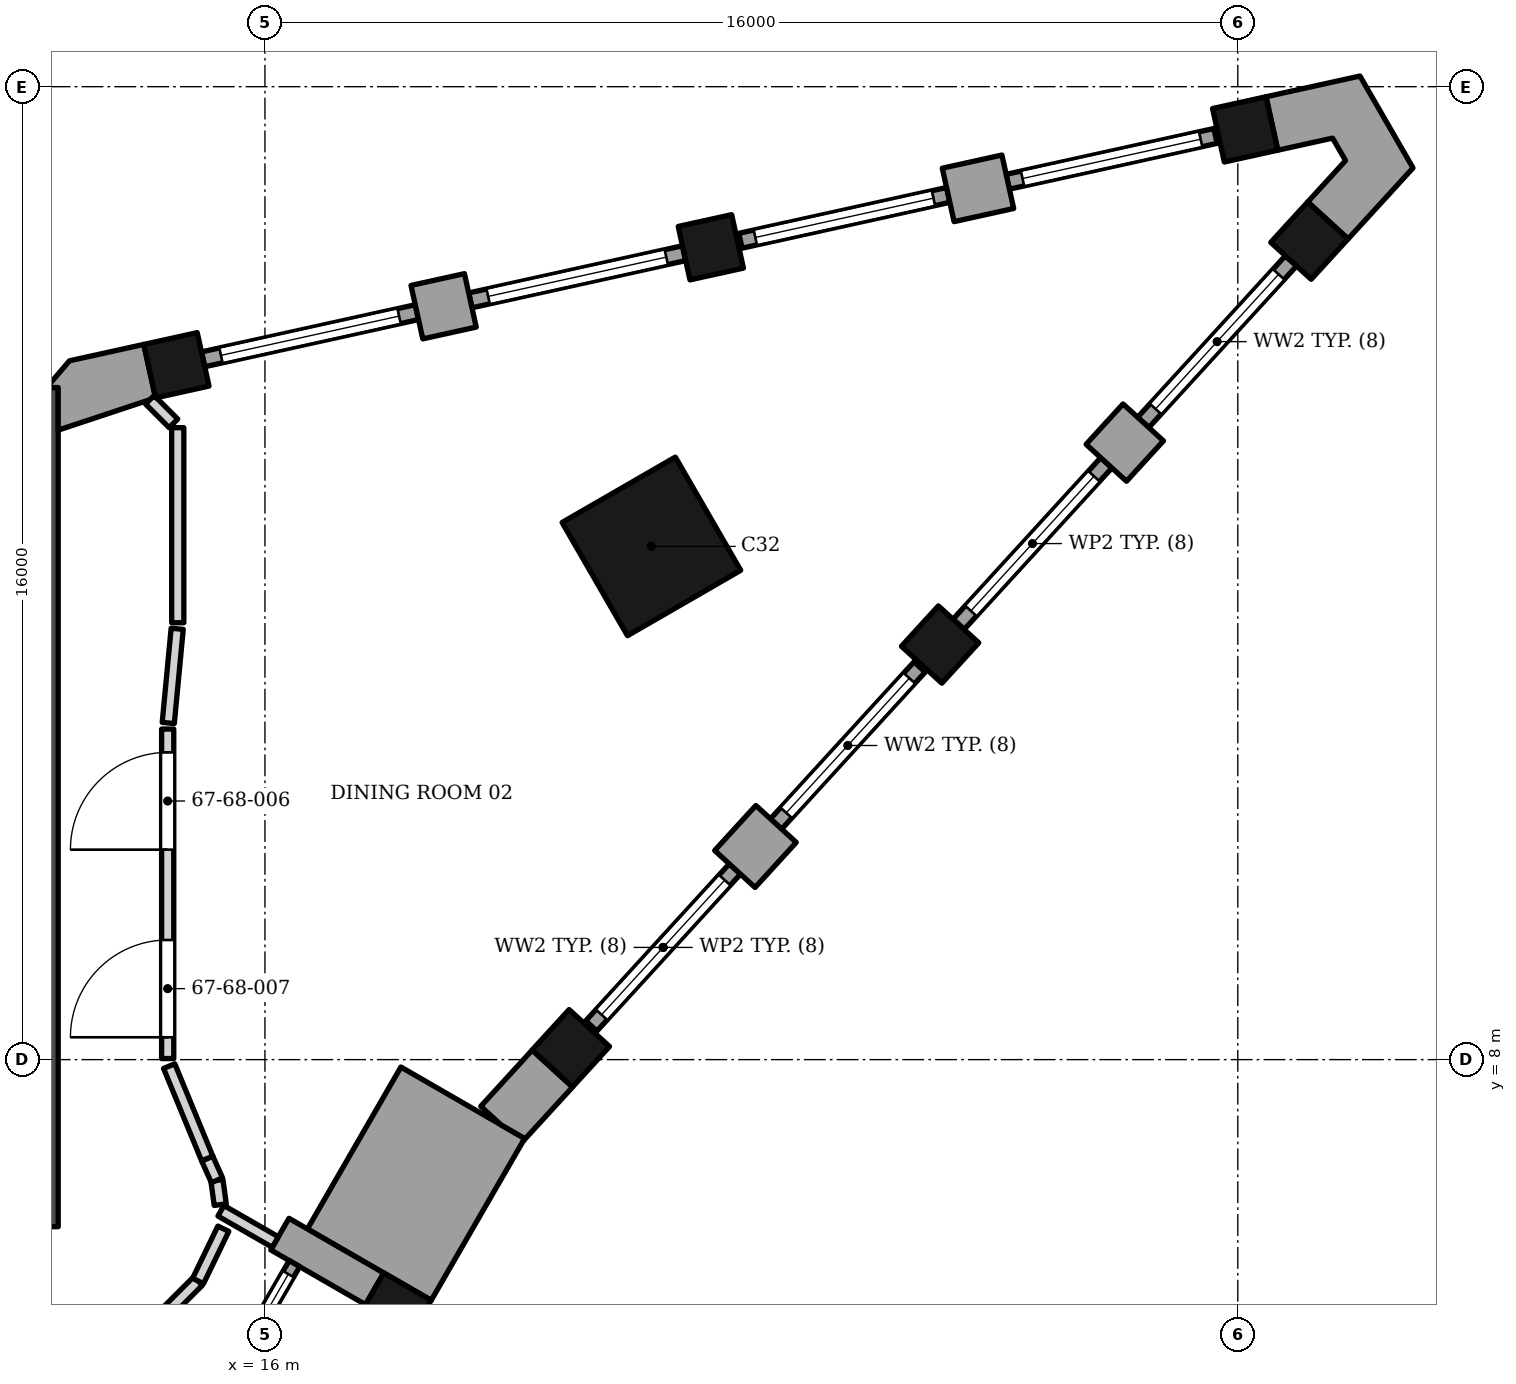
"""IFC4 building model, lengths in metres.
Left out: names, types, materials, properties, quantities, classifications, styles, units other than length and angle.
Written with IfcOpenShell. Run it as: python <this file> out.ifc"""

import sys

from ifc_helpers import new_model, si_unit, direction, frame, frame_2d, origin, origin_2d, place, context, subcontext, project, spatial, polyline, rectangle, outline, extrude, element, fill, save


model = new_model("IFC4")
c1 = context("Model", 3, precision=1e-05, world=origin(), true_north=direction((0.0, 1.0)))
c2 = subcontext(c1, "Body", "Model", "MODEL_VIEW")
j1 = project(units=[si_unit("LENGTHUNIT", "METRE"), si_unit("PLANEANGLEUNIT", "RADIAN")], contexts=[c1])
p1 = place(None, origin())
s1 = spatial("IfcSite", under=j1, at=p1, CompositionType="ELEMENT")
p2 = place(p1, origin())
s2 = spatial("IfcBuilding", under=s1, at=p2, CompositionType="ELEMENT")
p3 = place(p2, frame((0.0, 0.0, 279.4)))
s3 = spatial("IfcBuildingStorey", under=s2, at=p3, CompositionType="ELEMENT", Elevation=279.4)
p4 = place(p3, frame((12.35, 5.253, 0.0), z_axis=(0.0, 0.0, 1.0), x_axis=(0.0, 1.0, 0.0)))
e1 = element("IfcWall", 1, at=p4, inside=s3, PredefinedType="SHEAR", context=c2, shape_type="SweptSolid", body=[
    extrude(rectangle(XDim=13.8, YDim=0.5, at=frame_2d((6.9, 0.0))), origin(), (0.0, 0.0, 1.0), 3.9),
])
p5 = place(p3, frame((22.356, 16.44, 0.0), z_axis=(0.0, 0.0, 1.0), x_axis=(-0.866025403784, -0.5, 0.0)))
e2 = element("IfcColumn", 2, at=p5, inside=s3, PredefinedType="COLUMN", context=c2, shape_type="SweptSolid", body=[
    extrude(rectangle(XDim=2.15, YDim=2.15, at=origin_2d()), origin(), (0.0, 0.0, 1.0), 3.9),
])
for number, where, z_axis, x_axis in (
    (3, (18.119, 3.877, 0.0), (0.0, 0.0, 1.0), (0.5, 0.866, 0.0)),
    (4, (21.031, 8.187, 0.0), (0.0, 0.0, 1.0), (0.675, 0.738, 0.0)),
    (5, (27.104, 14.826, 0.0), (0.0, 0.0, 1.0), (0.675, 0.738, 0.0)),
    (6, (33.178, 21.468, 0.0), (0.0, 0.0, 1.0), (0.675, 0.738, 0.0)),
    (7, (32.121, 23.298, 0.0), (0.0, 0.0, 1.0), (-0.977, -0.215, 0.0)),
    (8, (23.333, 21.359, 0.0), (0.0, 0.0, 1.0), (-0.977, -0.215, 0.0)),
    (9, (14.544, 19.419, 0.0), (0.0, 0.0, 1.0), (-0.977, -0.215, 0.0)),
):
    element("IfcColumn", number, at=place(p3, frame(where, z_axis=z_axis, x_axis=x_axis)), inside=s3, PredefinedType="COLUMN", context=c2, shape_type="SweptSolid", body=[
        extrude(rectangle(XDim=0.9, YDim=0.9, at=origin_2d()), origin(), (0.0, 0.0, 1.0), 3.9),
    ])
p6 = place(p3, frame((17.803, 4.231, 0.0), z_axis=(0.0, 0.0, 1.0), x_axis=(-0.866004803686, 0.500035678719, 0.0)))
e10 = element("IfcWall", 10, at=p6, inside=s3, PredefinedType="SOLIDWALL", context=c2, shape_type="SweptSolid", body=[
    extrude(rectangle(XDim=1.799, YDim=0.6, at=frame_2d((0.899, 0.0))), origin(), (0.0, 0.0, 1.0), 2.95),
])
p7 = place(p3, frame((14.385, 1.008, 0.0), z_axis=(0.0, 0.0, 1.0), x_axis=(0.500027713859, 0.866009402589, 0.0)))
e11 = element("IfcWall", 11, at=p7, inside=s3, PredefinedType="ELEMENTEDWALL", context=c2, shape_type="SweptSolid", body=[
    extrude(rectangle(XDim=4.2, YDim=0.2, at=frame_2d((2.1, 0.0))), origin(), (0.0, 0.0, 1.0), 2.95),
])
p8 = place(p7, frame((0.2, 0.0, 0.45)))
e12 = element("IfcOpeningElement", 12, at=p8, cuts=e11, PredefinedType="OPENING", context=c2, shape_type="SweptSolid", body=[
    extrude(rectangle(XDim=3.8, YDim=2.25, at=frame_2d((1.9, 1.125))), frame((0.0, 0.11, 0.0), z_axis=(0.0, -1.0, 0.0), x_axis=(1.0, 0.0, 0.0)), (0.0, 0.0, 1.0), 0.22),
])
p9 = place(p3, origin())
e13 = element("IfcWall", 13, at=p9, inside=s3, PredefinedType="SOLIDWALL", context=c2, shape_type="SweptSolid", body=[
    extrude(outline(polyline([(18.734, 4.042), (18.733, 4.041), (18.734, 4.04), (20.271, 6.703), (18.236, 7.878), (16.698, 5.215), (17.954, 4.49), (17.954, 4.492), (18.734, 4.042)])), origin(), (0.0, 0.0, 1.0), 2.974),
])
p10 = place(p3, frame((23.729, 11.135, 0.0), z_axis=(0.0, 0.0, 1.0), x_axis=(0.674788120713, 0.738011512203, 0.0)))
e14 = element("IfcWall", 14, at=p10, inside=s3, PredefinedType="SOLIDWALL", context=c2, shape_type="SweptSolid", body=[
    extrude(rectangle(XDim=1.004, YDim=0.9, at=frame_2d((0.502, 0.0))), origin(), (0.0, 0.0, 1.0), 3.0),
])
p11 = place(p3, frame((30.445, 18.479, 0.0), z_axis=(0.0, 0.0, 1.0), x_axis=(-0.674938051731, -0.737874397391, 0.0)))
e15 = element("IfcWall", 15, at=p11, inside=s3, PredefinedType="SOLIDWALL", context=c2, shape_type="SweptSolid", body=[
    extrude(rectangle(XDim=0.9, YDim=0.9, at=frame_2d((0.45, 0.0))), origin(), (0.0, 0.0, 1.0), 3.0),
])
p12 = place(p3, frame((21.368, 8.554, 0.0), z_axis=(0.0, 0.0, 1.0), x_axis=(0.67487449122, 0.737932531537, 0.0)))
e16 = element("IfcWall", 16, at=p12, inside=s3, PredefinedType="ELEMENTEDWALL", context=c2, shape_type="SweptSolid", body=[
    extrude(rectangle(XDim=3.5, YDim=0.25, at=frame_2d((1.75, 0.0))), origin(), (0.0, 0.0, 1.0), 3.0),
])
p13 = place(p12, frame((0.25, 0.0, 0.3)))
e17 = element("IfcOpeningElement", 17, at=p13, cuts=e16, PredefinedType="OPENING", context=c2, shape_type="SweptSolid", body=[
    extrude(rectangle(XDim=3.0, YDim=2.5, at=frame_2d((1.5, 1.25))), frame((0.0, 0.135, 0.0), z_axis=(0.0, -1.0, 0.0), x_axis=(1.0, 0.0, 0.0)), (0.0, 0.0, 1.0), 0.27),
])
p14 = place(p3, frame((24.405, 11.875, 0.0), z_axis=(0.0, 0.0, 1.0), x_axis=(0.67487449122, 0.737932531537, 0.0)))
e18 = element("IfcWall", 18, at=p14, inside=s3, PredefinedType="ELEMENTEDWALL", context=c2, shape_type="SweptSolid", body=[
    extrude(rectangle(XDim=3.5, YDim=0.25, at=frame_2d((1.75, 0.0))), origin(), (0.0, 0.0, 1.0), 3.0),
])
p15 = place(p14, frame((0.25, 0.0, 0.3)))
e19 = element("IfcOpeningElement", 19, at=p15, cuts=e18, PredefinedType="OPENING", context=c2, shape_type="SweptSolid", body=[
    extrude(rectangle(XDim=3.0, YDim=2.5, at=frame_2d((1.5, 1.25))), frame((0.0, 0.135, 0.0), z_axis=(0.0, -1.0, 0.0), x_axis=(1.0, 0.0, 0.0)), (0.0, 0.0, 1.0), 0.27),
])
p16 = place(p3, frame((27.408, 15.158, 0.0), z_axis=(0.0, 0.0, 1.0), x_axis=(0.674833575111, 0.737969949187, 0.0)))
e20 = element("IfcWall", 20, at=p16, inside=s3, PredefinedType="ELEMENTEDWALL", context=c2, shape_type="SweptSolid", body=[
    extrude(rectangle(XDim=3.6, YDim=0.25, at=frame_2d((1.8, 0.0))), origin(), (0.0, 0.0, 1.0), 3.0),
])
p17 = place(p16, frame((0.3, 0.0, 0.3)))
e21 = element("IfcOpeningElement", 21, at=p17, cuts=e20, PredefinedType="OPENING", context=c2, shape_type="SweptSolid", body=[
    extrude(rectangle(XDim=3.0, YDim=2.5, at=frame_2d((1.5, 1.25))), frame((0.0, 0.135, 0.0), z_axis=(0.0, -1.0, 0.0), x_axis=(1.0, 0.0, 0.0)), (0.0, 0.0, 1.0), 0.27),
])
p18 = place(p3, frame((30.445, 18.479, 0.0), z_axis=(0.0, 0.0, 1.0), x_axis=(0.674833575111, 0.737969949187, 0.0)))
e22 = element("IfcWall", 22, at=p18, inside=s3, PredefinedType="ELEMENTEDWALL", context=c2, shape_type="SweptSolid", body=[
    extrude(rectangle(XDim=3.6, YDim=0.25, at=frame_2d((1.8, 0.0))), origin(), (0.0, 0.0, 1.0), 3.0),
])
p19 = place(p18, frame((0.3, 0.0, 0.3)))
e23 = element("IfcOpeningElement", 23, at=p19, cuts=e22, PredefinedType="OPENING", context=c2, shape_type="SweptSolid", body=[
    extrude(rectangle(XDim=3.0, YDim=2.5, at=frame_2d((1.5, 1.25))), frame((0.0, 0.135, 0.0), z_axis=(0.0, -1.0, 0.0), x_axis=(1.0, 0.0, 0.0)), (0.0, 0.0, 1.0), 0.27),
])
p20 = place(p3, frame((28.217, 22.436, 0.0), z_axis=(0.0, 0.0, 1.0), x_axis=(-0.97656888558, -0.215205045752, 0.0)))
e24 = element("IfcWall", 24, at=p20, inside=s3, PredefinedType="SOLIDWALL", context=c2, shape_type="SweptSolid", body=[
    extrude(rectangle(XDim=1.004, YDim=0.9, at=frame_2d((0.502, 0.0))), origin(), (0.0, 0.0, 1.0), 3.0),
])
p21 = place(p3, frame((18.499, 20.292, 0.0), z_axis=(0.0, 0.0, 1.0), x_axis=(0.976473402733, 0.215637876437, 0.0)))
e25 = element("IfcWall", 25, at=p21, inside=s3, PredefinedType="SOLIDWALL", context=c2, shape_type="SweptSolid", body=[
    extrude(rectangle(XDim=0.9, YDim=0.9, at=frame_2d((0.45, 0.0))), origin(), (0.0, 0.0, 1.0), 3.0),
])
p22 = place(p3, frame((31.633, 23.19, 0.0), z_axis=(0.0, 0.0, 1.0), x_axis=(-0.976509313763, -0.215475196101, 0.0)))
e26 = element("IfcWall", 26, at=p22, inside=s3, PredefinedType="ELEMENTEDWALL", context=c2, shape_type="SweptSolid", body=[
    extrude(rectangle(XDim=3.5, YDim=0.25, at=frame_2d((1.75, 0.0))), origin(), (0.0, 0.0, 1.0), 3.0),
])
p23 = place(p22, frame((0.25, 0.0, 0.3)))
e27 = element("IfcOpeningElement", 27, at=p23, cuts=e26, PredefinedType="OPENING", context=c2, shape_type="SweptSolid", body=[
    extrude(rectangle(XDim=3.0, YDim=2.5, at=frame_2d((1.5, 1.25))), frame((0.0, 0.135, 0.0), z_axis=(0.0, -1.0, 0.0), x_axis=(1.0, 0.0, 0.0)), (0.0, 0.0, 1.0), 0.27),
])
p24 = place(p3, frame((27.239, 22.22, 0.0), z_axis=(0.0, 0.0, 1.0), x_axis=(-0.976509313763, -0.215475196101, 0.0)))
e28 = element("IfcWall", 28, at=p24, inside=s3, PredefinedType="ELEMENTEDWALL", context=c2, shape_type="SweptSolid", body=[
    extrude(rectangle(XDim=3.5, YDim=0.25, at=frame_2d((1.75, 0.0))), origin(), (0.0, 0.0, 1.0), 3.0),
])
p25 = place(p24, frame((0.25, 0.0, 0.3)))
e29 = element("IfcOpeningElement", 29, at=p25, cuts=e28, PredefinedType="OPENING", context=c2, shape_type="SweptSolid", body=[
    extrude(rectangle(XDim=3.0, YDim=2.5, at=frame_2d((1.5, 1.25))), frame((0.0, 0.135, 0.0), z_axis=(0.0, -1.0, 0.0), x_axis=(1.0, 0.0, 0.0)), (0.0, 0.0, 1.0), 0.27),
])
p26 = place(p3, frame((22.893, 21.262, 0.0), z_axis=(0.0, 0.0, 1.0), x_axis=(-0.976513072969, -0.215458159096, 0.0)))
e30 = element("IfcWall", 30, at=p26, inside=s3, PredefinedType="ELEMENTEDWALL", context=c2, shape_type="SweptSolid", body=[
    extrude(rectangle(XDim=3.6, YDim=0.25, at=frame_2d((1.8, 0.0))), origin(), (0.0, 0.0, 1.0), 3.0),
])
p27 = place(p26, frame((0.3, 0.0, 0.3)))
e31 = element("IfcOpeningElement", 31, at=p27, cuts=e30, PredefinedType="OPENING", context=c2, shape_type="SweptSolid", body=[
    extrude(rectangle(XDim=3.0, YDim=2.5, at=frame_2d((1.5, 1.25))), frame((0.0, 0.135, 0.0), z_axis=(0.0, -1.0, 0.0), x_axis=(1.0, 0.0, 0.0)), (0.0, 0.0, 1.0), 0.27),
])
p28 = place(p3, frame((18.499, 20.292, 0.0), z_axis=(0.0, 0.0, 1.0), x_axis=(-0.976513072969, -0.215458159096, 0.0)))
e32 = element("IfcWall", 32, at=p28, inside=s3, PredefinedType="ELEMENTEDWALL", context=c2, shape_type="SweptSolid", body=[
    extrude(rectangle(XDim=3.6, YDim=0.25, at=frame_2d((1.8, 0.0))), origin(), (0.0, 0.0, 1.0), 3.0),
])
p29 = place(p28, frame((0.3, 0.0, 0.3)))
e33 = element("IfcOpeningElement", 33, at=p29, cuts=e32, PredefinedType="OPENING", context=c2, shape_type="SweptSolid", body=[
    extrude(rectangle(XDim=3.0, YDim=2.5, at=frame_2d((1.5, 1.25))), frame((0.0, 0.135, 0.0), z_axis=(0.0, -1.0, 0.0), x_axis=(1.0, 0.0, 0.0)), (0.0, 0.0, 1.0), 0.27),
])
p30 = place(p3, origin())
e34 = element("IfcWall", 34, at=p30, inside=s3, PredefinedType="SOLIDWALL", context=c2, shape_type="SweptSolid", body=[
    extrude(outline(polyline([(20.395, 8.156), (19.549, 7.232), (19.881, 6.928), (20.271, 6.703), (20.247, 6.661), (21.059, 7.549), (20.395, 8.156)])), origin(), (0.0, 0.0, 1.0), 3.0),
])
p31 = place(p3, origin())
e35 = element("IfcWall", 35, at=p31, inside=s3, PredefinedType="SOLIDWALL", context=c2, shape_type="SweptSolid", body=[
    extrude(outline(polyline([(33.814, 21.496), (34.882, 22.664), (34.009, 24.175), (32.464, 23.834), (32.658, 22.955), (33.559, 23.154), (33.772, 22.785), (33.15, 22.104), (33.814, 21.496)])), origin(), (0.0, 0.0, 1.0), 3.0),
])
p32 = place(p3, origin())
e36 = element("IfcWall", 36, at=p32, inside=s3, PredefinedType="SOLIDWALL", context=c2, shape_type="SweptSolid", body=[
    extrude(outline(polyline([(14.201, 18.883), (14.008, 19.762), (12.784, 19.492), (12.41, 19.052), (12.6, 19.052), (12.6, 18.352), (14.201, 18.883)])), origin(), (0.0, 0.0, 1.0), 3.0),
])
p33 = place(p3, frame((14.311, 3.77, 0.0), z_axis=(0.0, 0.0, 1.0), x_axis=(0.707106781187, 0.707106781187, 0.0)))
e37 = element("IfcWall", 37, at=p33, inside=s3, PredefinedType="PARTITIONING", context=c2, shape_type="SweptSolid", body=[
    extrude(rectangle(XDim=0.834, YDim=0.2, at=frame_2d((0.417, 0.0))), origin(), (0.0, 0.0, 1.0), 3.73),
])
p34 = place(p3, frame((15.277, 5.514, 0.0), z_axis=(0.0, 0.0, 1.0), x_axis=(0.866957478323, -0.498382113222, 0.0)))
e38 = element("IfcWall", 38, at=p34, inside=s3, PredefinedType="PARTITIONING", context=c2, shape_type="SweptSolid", body=[
    extrude(rectangle(XDim=1.031, YDim=0.2, at=frame_2d((0.515, 0.0))), origin(), (0.0, 0.0, 1.0), 2.95),
])
p35 = place(p3, frame((14.9, 4.36, 0.0), z_axis=(0.0, 0.0, 1.0), x_axis=(0.435199770088, 0.900333915897, 0.0)))
e39 = element("IfcWall", 39, at=p35, inside=s3, PredefinedType="PARTITIONING", context=c2, shape_type="SweptSolid", body=[
    extrude(rectangle(XDim=0.954, YDim=0.2, at=frame_2d((0.477, 0.0))), origin(), (0.0, 0.0, 1.0), 2.95),
])
p36 = place(p3, frame((15.211, 6.016, 0.0), z_axis=(0.0, 0.0, 1.0), x_axis=(0.133309467874, -0.991074460258, 0.0)))
e40 = element("IfcWall", 40, at=p36, inside=s3, PredefinedType="PARTITIONING", context=c2, shape_type="SweptSolid", body=[
    extrude(rectangle(XDim=0.405, YDim=0.2, at=frame_2d((0.202, 0.0))), origin(), (0.0, 0.0, 1.0), 3.73),
])
p37 = place(p3, frame((15.051, 6.374, 0.0), z_axis=(0.0, 0.0, 1.0), x_axis=(0.408161090952, -0.912909920985, 0.0)))
e41 = element("IfcWall", 41, at=p37, inside=s3, PredefinedType="PARTITIONING", context=c2, shape_type="SweptSolid", body=[
    extrude(rectangle(XDim=0.392, YDim=0.2, at=frame_2d((0.196, 0.0))), origin(), (0.0, 0.0, 1.0), 3.73),
])
p38 = place(p3, frame((14.425, 7.893, 0.0), z_axis=(0.0, 0.0, 1.0), x_axis=(0.380824536343, -0.924647323318, 0.0)))
e42 = element("IfcWall", 42, at=p38, inside=s3, PredefinedType="PARTITIONING", context=c2, shape_type="SweptSolid", body=[
    extrude(rectangle(XDim=1.643, YDim=0.2, at=frame_2d((0.822, 0.0))), origin(), (0.0, 0.0, 1.0), 3.73),
])
p39 = place(p3, frame((14.4, 8.017, 0.0), z_axis=(0.0, 0.0, 1.0), x_axis=(0.0, 1.0, 0.0)))
e43 = element("IfcWall", 43, at=p39, inside=s3, PredefinedType="PARTITIONING", context=c2, shape_type="SweptSolid", body=[
    extrude(rectangle(XDim=5.419, YDim=0.2, at=frame_2d((2.709, 0.0))), origin(), (0.0, 0.0, 1.0), 3.73),
])
p40 = place(p39, frame((3.435, 0.0, 0.0)))
e44 = element("IfcOpeningElement", 44, at=p40, cuts=e43, PredefinedType="OPENING", context=c2, shape_type="SweptSolid", body=[
    extrude(rectangle(XDim=1.6, YDim=2.1, at=frame_2d((0.8, 1.05))), frame((0.0, 0.11, 0.0), z_axis=(0.0, -1.0, 0.0), x_axis=(1.0, 0.0, 0.0)), (0.0, 0.0, 1.0), 0.22),
])
p41 = place(p39, frame((0.35, 0.0, 0.0)))
e45 = element("IfcOpeningElement", 45, at=p41, cuts=e43, PredefinedType="OPENING", context=c2, shape_type="SweptSolid", body=[
    extrude(rectangle(XDim=1.6, YDim=2.1, at=frame_2d((0.8, 1.05))), frame((0.0, 0.11, 0.0), z_axis=(0.0, -1.0, 0.0), x_axis=(1.0, 0.0, 0.0)), (0.0, 0.0, 1.0), 0.22),
])
p42 = place(p3, frame((14.41, 13.536, 0.0), z_axis=(0.0, 0.0, 1.0), x_axis=(0.094453682086, 0.9955292572, 0.0)))
e46 = element("IfcWall", 46, at=p42, inside=s3, PredefinedType="PARTITIONING", context=c2, shape_type="SweptSolid", body=[
    extrude(rectangle(XDim=1.556, YDim=0.2, at=frame_2d((0.778, 0.0))), origin(), (0.0, 0.0, 1.0), 3.73),
])
p43 = place(p3, frame((14.566, 18.393, 0.0), z_axis=(0.0, 0.0, 1.0), x_axis=(0.0, -1.0, 0.0)))
e47 = element("IfcWall", 47, at=p43, inside=s3, PredefinedType="PARTITIONING", context=c2, shape_type="SweptSolid", body=[
    extrude(rectangle(XDim=3.208, YDim=0.2, at=frame_2d((1.604, 0.0))), origin(), (0.0, 0.0, 1.0), 3.73),
])
p44 = place(p3, frame((14.107, 18.852, 0.0), z_axis=(0.0, 0.0, 1.0), x_axis=(0.707106781187, -0.707106781187, 0.0)))
e48 = element("IfcWall", 48, at=p44, inside=s3, PredefinedType="PARTITIONING", context=c2, shape_type="SweptSolid", body=[
    extrude(rectangle(XDim=0.549, YDim=0.2, at=frame_2d((0.275, 0.0))), origin(), (0.0, 0.0, 1.0), 3.73),
])
p45 = place(p8, origin())
e49 = element("IfcWindow", 49, at=p45, inside=s3, PartitioningType="SINGLE_PANEL", PredefinedType="WINDOW", context=c2, shape_type="SweptSolid", body=[
    extrude(rectangle(XDim=3.8, YDim=2.25, at=frame_2d((1.9, 1.125))), frame((0.0, 0.03, 0.0), z_axis=(0.0, -1.0, 0.0), x_axis=(1.0, 0.0, 0.0)), (0.0, 0.0, 1.0), 0.06),
])
fill(e12, e49)
p46 = place(p13, origin())
e50 = element("IfcWindow", 50, at=p46, inside=s3, PartitioningType="SINGLE_PANEL", PredefinedType="WINDOW", context=c2, shape_type="SweptSolid", body=[
    extrude(rectangle(XDim=3.0, YDim=2.5, at=frame_2d((1.5, 1.25))), frame((0.0, 0.03, 0.0), z_axis=(0.0, -1.0, 0.0), x_axis=(1.0, 0.0, 0.0)), (0.0, 0.0, 1.0), 0.06),
])
fill(e17, e50)
p47 = place(p15, origin())
e51 = element("IfcWindow", 51, at=p47, inside=s3, PartitioningType="SINGLE_PANEL", PredefinedType="WINDOW", context=c2, shape_type="SweptSolid", body=[
    extrude(rectangle(XDim=3.0, YDim=2.5, at=frame_2d((1.5, 1.25))), frame((0.0, 0.03, 0.0), z_axis=(0.0, -1.0, 0.0), x_axis=(1.0, 0.0, 0.0)), (0.0, 0.0, 1.0), 0.06),
])
fill(e19, e51)
p48 = place(p17, origin())
e52 = element("IfcWindow", 52, at=p48, inside=s3, PartitioningType="SINGLE_PANEL", PredefinedType="WINDOW", context=c2, shape_type="SweptSolid", body=[
    extrude(rectangle(XDim=3.0, YDim=2.5, at=frame_2d((1.5, 1.25))), frame((0.0, 0.03, 0.0), z_axis=(0.0, -1.0, 0.0), x_axis=(1.0, 0.0, 0.0)), (0.0, 0.0, 1.0), 0.06),
])
fill(e21, e52)
p49 = place(p19, origin())
e53 = element("IfcWindow", 53, at=p49, inside=s3, PartitioningType="SINGLE_PANEL", PredefinedType="WINDOW", context=c2, shape_type="SweptSolid", body=[
    extrude(rectangle(XDim=3.0, YDim=2.5, at=frame_2d((1.5, 1.25))), frame((0.0, 0.03, 0.0), z_axis=(0.0, -1.0, 0.0), x_axis=(1.0, 0.0, 0.0)), (0.0, 0.0, 1.0), 0.06),
])
fill(e23, e53)
p50 = place(p23, origin())
e54 = element("IfcWindow", 54, at=p50, inside=s3, PartitioningType="SINGLE_PANEL", PredefinedType="WINDOW", context=c2, shape_type="SweptSolid", body=[
    extrude(rectangle(XDim=3.0, YDim=2.5, at=frame_2d((1.5, 1.25))), frame((0.0, 0.03, 0.0), z_axis=(0.0, -1.0, 0.0), x_axis=(1.0, 0.0, 0.0)), (0.0, 0.0, 1.0), 0.06),
])
fill(e27, e54)
p51 = place(p25, origin())
e55 = element("IfcWindow", 55, at=p51, inside=s3, PartitioningType="SINGLE_PANEL", PredefinedType="WINDOW", context=c2, shape_type="SweptSolid", body=[
    extrude(rectangle(XDim=3.0, YDim=2.5, at=frame_2d((1.5, 1.25))), frame((0.0, 0.03, 0.0), z_axis=(0.0, -1.0, 0.0), x_axis=(1.0, 0.0, 0.0)), (0.0, 0.0, 1.0), 0.06),
])
fill(e29, e55)
p52 = place(p27, origin())
e56 = element("IfcWindow", 56, at=p52, inside=s3, PartitioningType="SINGLE_PANEL", PredefinedType="WINDOW", context=c2, shape_type="SweptSolid", body=[
    extrude(rectangle(XDim=3.0, YDim=2.5, at=frame_2d((1.5, 1.25))), frame((0.0, 0.03, 0.0), z_axis=(0.0, -1.0, 0.0), x_axis=(1.0, 0.0, 0.0)), (0.0, 0.0, 1.0), 0.06),
])
fill(e31, e56)
p53 = place(p29, origin())
e57 = element("IfcWindow", 57, at=p53, inside=s3, PartitioningType="SINGLE_PANEL", PredefinedType="WINDOW", context=c2, shape_type="SweptSolid", body=[
    extrude(rectangle(XDim=3.0, YDim=2.5, at=frame_2d((1.5, 1.25))), frame((0.0, 0.03, 0.0), z_axis=(0.0, -1.0, 0.0), x_axis=(1.0, 0.0, 0.0)), (0.0, 0.0, 1.0), 0.06),
])
fill(e33, e57)
p54 = place(p40, origin())
e58 = element("IfcDoor", 58, at=p54, inside=s3, OperationType="DOUBLE_DOOR_SINGLE_SWING", PredefinedType="DOOR", context=c2, shape_type="SweptSolid", body=[
    extrude(rectangle(XDim=1.6, YDim=2.1, at=frame_2d((0.8, 1.05))), frame((0.0, 0.025, 0.0), z_axis=(0.0, -1.0, 0.0), x_axis=(1.0, 0.0, 0.0)), (0.0, 0.0, 1.0), 0.05),
])
fill(e44, e58)
p55 = place(p41, origin())
e59 = element("IfcDoor", 59, at=p55, inside=s3, OperationType="DOUBLE_DOOR_SINGLE_SWING", PredefinedType="DOOR", context=c2, shape_type="SweptSolid", body=[
    extrude(rectangle(XDim=1.6, YDim=2.1, at=frame_2d((0.8, 1.05))), frame((0.0, 0.025, 0.0), z_axis=(0.0, -1.0, 0.0), x_axis=(1.0, 0.0, 0.0)), (0.0, 0.0, 1.0), 0.05),
])
fill(e45, e59)
save(model, sys.argv[1])
